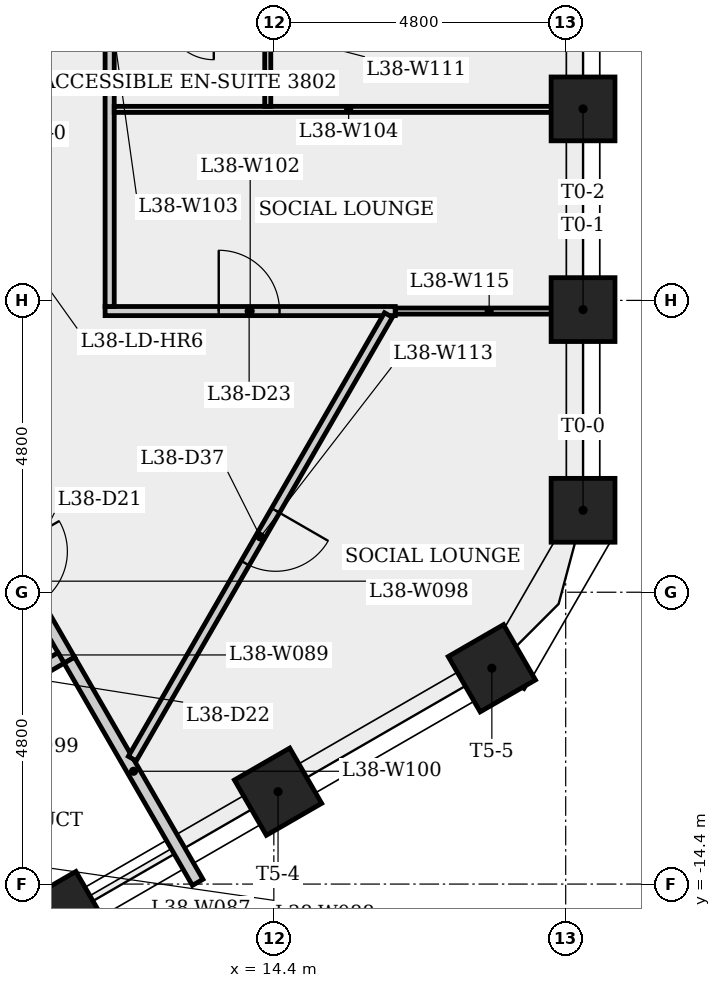
"""IFC4 building model, lengths in metres.
Left out: names, types, materials, properties, quantities, classifications, styles, units other than length and angle.
Written with IfcOpenShell. Run it as: python <this file> out.ifc"""

import sys

from ifc_helpers import new_model, si_unit, direction, frame, frame_2d, origin, origin_2d, place, context, subcontext, project, spatial, rectangle, extrude, element, fill, save


model = new_model("IFC4")
c1 = context("Model", 3, precision=1e-05, world=origin(), true_north=direction((0.0, 1.0)))
c2 = subcontext(c1, "Body", "Model", "MODEL_VIEW")
j1 = project(units=[si_unit("LENGTHUNIT", "METRE"), si_unit("PLANEANGLEUNIT", "RADIAN")], contexts=[c1])
p1 = place(None, origin())
s1 = spatial("IfcSite", under=j1, at=p1, CompositionType="ELEMENT")
p2 = place(p1, origin())
s2 = spatial("IfcBuilding", under=s1, at=p2, CompositionType="ELEMENT")
p3 = place(p2, frame((0.0, 0.0, 143.9)))
s3 = spatial("IfcBuildingStorey", under=s2, at=p3, CompositionType="ELEMENT", Elevation=143.9)
for number, where, z_axis, x_axis in (
    (1, (19.486, -8.252, 0.0), (0.0, 0.0, 1.0), (1.0, 0.0, 0.0)),
    (2, (19.486, -4.951, 0.0), (0.0, 0.0, 1.0), (1.0, 0.0, 0.0)),
    (3, (19.486, -1.65, 0.0), (0.0, 0.0, 1.0), (1.0, 0.0, 0.0)),
    (4, (10.953, -14.911, 0.0), (0.0, 0.0, 1.0), (0.5, -0.866, 0.0)),
    (5, (14.469, -12.88, 0.0), (0.0, 0.0, 1.0), (0.5, -0.866, 0.0)),
    (6, (17.986, -10.85, 0.0), (0.0, 0.0, 1.0), (0.5, -0.866, 0.0)),
):
    element("IfcColumn", number, at=place(p3, frame(where, z_axis=z_axis, x_axis=x_axis)), inside=s3, PredefinedType="COLUMN", context=c2, shape_type="SweptSolid", body=[
        extrude(rectangle(XDim=1.05, YDim=1.05, at=origin_2d()), origin(), (0.0, 0.0, 1.0), 4.0),
    ])
p4 = place(p3, frame((9.537, -8.119, 0.0), z_axis=(0.0, 0.0, 1.0), x_axis=(0.499990139034, -0.866031096941, 0.0)))
e7 = element("IfcWall", 7, at=p4, inside=s3, PredefinedType="PARTITIONING", context=c2, shape_type="SweptSolid", body=[
    extrude(rectangle(XDim=3.0, YDim=0.2, at=frame_2d((1.5, 0.0))), origin(), (0.0, 0.0, 1.0), 3.6),
])
p5 = place(p4, frame((0.935, 0.0, 0.0)))
e8 = element("IfcOpeningElement", 8, at=p5, cuts=e7, PredefinedType="OPENING", context=c2, shape_type="SweptSolid", body=[
    extrude(rectangle(XDim=1.0, YDim=2.1, at=frame_2d((0.5, 1.05))), frame((0.0, 0.11, 0.0), z_axis=(0.0, -1.0, 0.0), x_axis=(1.0, 0.0, 0.0)), (0.0, 0.0, 1.0), 0.22),
])
p6 = place(p3, frame((10.901, -10.681, 0.0), z_axis=(0.0, 0.0, 1.0), x_axis=(-0.866007538022, -0.500030943131, 0.0)))
e9 = element("IfcWall", 9, at=p6, inside=s3, PredefinedType="PLUMBINGWALL", context=c2, shape_type="SweptSolid", body=[
    extrude(rectangle(XDim=2.375, YDim=0.2, at=frame_2d((1.188, 0.0))), origin(), (0.0, 0.0, 1.0), 3.6),
])
p7 = place(p3, frame((11.037, -10.717, 0.0), z_axis=(0.0, 0.0, 1.0), x_axis=(0.500002884005, -0.866023738697, 0.0)))
e10 = element("IfcWall", 10, at=p7, inside=s3, PredefinedType="PLUMBINGWALL", context=c2, shape_type="SweptSolid", body=[
    extrude(rectangle(XDim=4.22, YDim=0.2, at=frame_2d((2.11, 0.0))), origin(), (0.0, 0.0, 1.0), 3.6),
])
p8 = place(p3, frame((11.625, -4.976, 0.0), z_axis=(0.0, 0.0, 1.0), x_axis=(1.0, 0.0, 0.0)))
e11 = element("IfcWall", 11, at=p8, inside=s3, PredefinedType="PARTITIONING", context=c2, shape_type="SweptSolid", body=[
    extrude(rectangle(XDim=4.772, YDim=0.15, at=frame_2d((2.386, 0.0))), origin(), (0.0, 0.0, 1.0), 3.6),
])
p9 = place(p8, frame((1.869, 0.0, 0.0)))
e12 = element("IfcOpeningElement", 12, at=p9, cuts=e11, PredefinedType="OPENING", context=c2, shape_type="SweptSolid", body=[
    extrude(rectangle(XDim=1.0, YDim=2.1, at=frame_2d((0.5, 1.05))), frame((0.0, 0.085, 0.0), z_axis=(0.0, -1.0, 0.0), x_axis=(1.0, 0.0, 0.0)), (0.0, 0.0, 1.0), 0.17),
])
p10 = place(p3, frame((11.7, -4.9, 0.0), z_axis=(0.0, 0.0, 1.0), x_axis=(0.0, 1.0, 0.0)))
e13 = element("IfcWall", 13, at=p10, inside=s3, PredefinedType="PARTITIONING", context=c2, shape_type="SweptSolid", body=[
    extrude(rectangle(XDim=9.951, YDim=0.15, at=frame_2d((4.976, 0.0))), origin(), (0.0, 0.0, 1.0), 3.6),
])
p11 = place(p10, frame((5.259, 0.0, 0.0)))
e14 = element("IfcOpeningElement", 14, at=p11, cuts=e13, PredefinedType="OPENING", context=c2, shape_type="SweptSolid", body=[
    extrude(rectangle(XDim=0.9, YDim=2.1, at=frame_2d((0.45, 1.05))), frame((0.0, 0.085, 0.0), z_axis=(0.0, -1.0, 0.0), x_axis=(1.0, 0.0, 0.0)), (0.0, 0.0, 1.0), 0.17),
])
p12 = place(p3, frame((11.775, -1.658, 0.0), z_axis=(0.0, 0.0, 1.0), x_axis=(1.0, 0.0, 0.0)))
e15 = element("IfcWall", 15, at=p12, inside=s3, PredefinedType="PARTITIONING", context=c2, shape_type="SweptSolid", body=[
    extrude(rectangle(XDim=7.711, YDim=0.1, at=frame_2d((3.855, 0.0))), origin(), (0.0, 0.0, 1.0), 3.6),
])
p13 = place(p3, frame((14.3, -1.608, 0.0), z_axis=(0.0, 0.0, 1.0), x_axis=(0.0, 1.0, 0.0)))
e16 = element("IfcWall", 16, at=p13, inside=s3, PredefinedType="PARTITIONING", context=c2, shape_type="SweptSolid", body=[
    extrude(rectangle(XDim=1.617, YDim=0.1, at=frame_2d((0.809, 0.0))), origin(), (0.0, 0.0, 1.0), 3.6),
])
p14 = place(p3, frame((16.285, -5.041, 0.0), z_axis=(0.0, 0.0, 1.0), x_axis=(-0.499997548519, -0.866026819143, 0.0)))
e17 = element("IfcWall", 17, at=p14, inside=s3, PredefinedType="PARTITIONING", context=c2, shape_type="SweptSolid", body=[
    extrude(rectangle(XDim=8.425, YDim=0.15, at=frame_2d((4.212, 0.0))), origin(), (0.0, 0.0, 1.0), 3.6),
])
p15 = place(p14, frame((3.712, 0.0, 0.0)))
e18 = element("IfcOpeningElement", 18, at=p15, cuts=e17, PredefinedType="OPENING", context=c2, shape_type="SweptSolid", body=[
    extrude(rectangle(XDim=1.0, YDim=2.1, at=frame_2d((0.5, 1.05))), frame((0.0, 0.085, 0.0), z_axis=(0.0, -1.0, 0.0), x_axis=(1.0, 0.0, 0.0)), (0.0, 0.0, 1.0), 0.17),
])
p16 = place(p3, frame((19.486, -4.976, 0.0), z_axis=(0.0, 0.0, 1.0), x_axis=(-1.0, 0.0, 0.0)))
e19 = element("IfcWall", 19, at=p16, inside=s3, PredefinedType="PARTITIONING", context=c2, shape_type="SweptSolid", body=[
    extrude(rectangle(XDim=3.088, YDim=0.1, at=frame_2d((1.544, 0.0))), origin(), (0.0, 0.0, 1.0), 3.6),
])
p17 = place(p9, origin())
e20 = element("IfcDoor", 20, at=p17, inside=s3, OperationType="SINGLE_SWING_LEFT", PredefinedType="DOOR", context=c2, shape_type="SweptSolid", body=[
    extrude(rectangle(XDim=1.0, YDim=2.1, at=frame_2d((0.5, 1.05))), frame((0.0, 0.025, 0.0), z_axis=(0.0, -1.0, 0.0), x_axis=(1.0, 0.0, 0.0)), (0.0, 0.0, 1.0), 0.05),
])
fill(e12, e20)
p18 = place(p15, origin())
e21 = element("IfcDoor", 21, at=p18, inside=s3, OperationType="SINGLE_SWING_LEFT", PredefinedType="DOOR", context=c2, shape_type="SweptSolid", body=[
    extrude(rectangle(XDim=1.0, YDim=2.1, at=frame_2d((0.5, 1.05))), frame((0.0, 0.025, 0.0), z_axis=(0.0, -1.0, 0.0), x_axis=(1.0, 0.0, 0.0)), (0.0, 0.0, 1.0), 0.05),
])
fill(e18, e21)
save(model, sys.argv[1])
